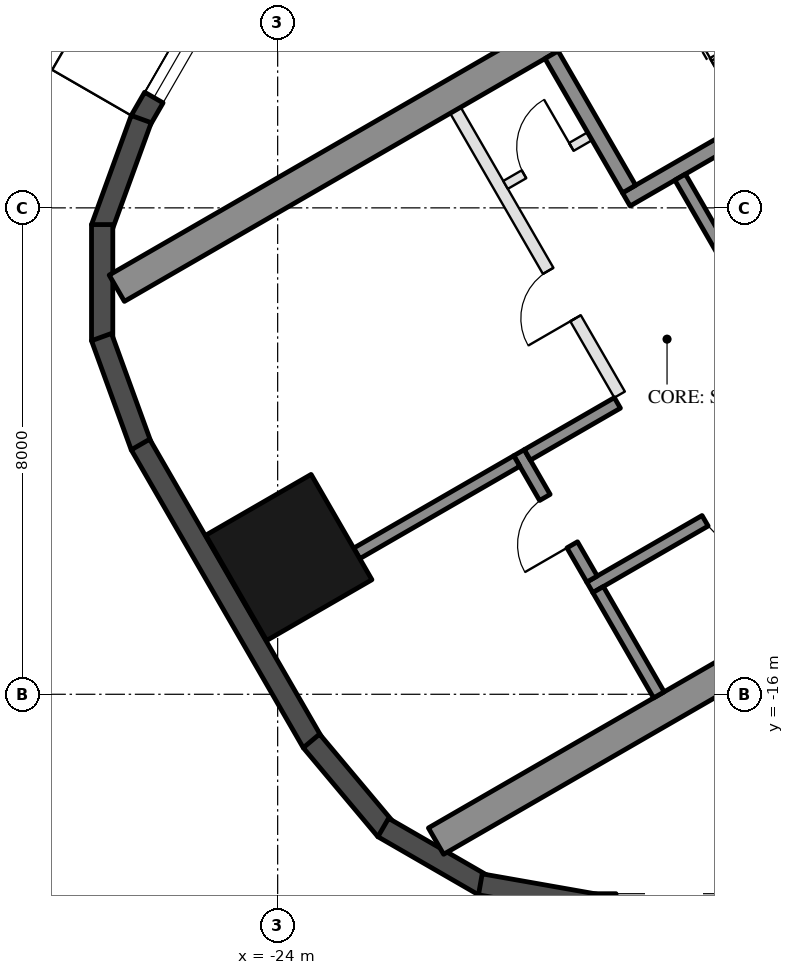
"""IFC4 building model, lengths in metres.
Left out: names, types, materials, properties, quantities, classifications, styles, units other than length and angle.
Written with IfcOpenShell. Run it as: python <this file> out.ifc"""

import sys

from ifc_helpers import new_model, si_unit, direction, frame, frame_2d, origin, origin_2d, place, context, subcontext, project, spatial, rectangle, hollow_rectangle, extrude, boolean, halfspace, element, fill, save


model = new_model("IFC4")
c1 = context("Model", 3, precision=1e-05, world=origin(), true_north=direction((0.0, 1.0)))
c2 = subcontext(c1, "Body", "Model", "MODEL_VIEW")
j1 = project(units=[si_unit("LENGTHUNIT", "METRE"), si_unit("PLANEANGLEUNIT", "RADIAN")], contexts=[c1])
p1 = place(None, origin())
s1 = spatial("IfcSite", under=j1, at=p1, CompositionType="ELEMENT")
p2 = place(p1, origin())
s2 = spatial("IfcBuilding", under=s1, at=p2, CompositionType="ELEMENT")
p3 = place(p2, frame((0.0, 0.0, 250.4)))
s3 = spatial("IfcBuildingStorey", under=s2, at=p3, CompositionType="ELEMENT", Elevation=250.4)
p4 = place(p3, frame((-23.816, -13.75, 0.0), z_axis=(0.0, 0.0, 1.0), x_axis=(-0.5, 0.866025403784, 0.0)))
e1 = element("IfcColumn", 1, at=p4, inside=s3, PredefinedType="COLUMN", context=c2, shape_type="SweptSolid", body=[
    boolean("DIFFERENCE", extrude(hollow_rectangle(XDim=2.0, YDim=2.0, WallThickness=0.05, at=origin_2d()), origin(), (0.0, 0.0, 1.0), 3.7), halfspace(frame((0.0, 0.0, 3.588), z_axis=(0.0, 0.0, 1.0), x_axis=(1.0, 0.0, 0.0)), False)),
])
p5 = place(p3, frame((-24.299, -3.176, 0.0), z_axis=(0.0, 0.0, 1.0), x_axis=(-0.500028278809, -0.866009076391, 0.0)))
e2 = element("IfcWall", 2, at=p5, inside=s3, PredefinedType="SOLIDWALL", context=c2, shape_type="SweptSolid", body=[
    extrude(rectangle(XDim=3.916, YDim=0.35, at=frame_2d((1.958, 0.0))), origin(), (0.0, 0.0, 1.0), 3.55),
])
p6 = place(p5, frame((1.575, 0.0, 0.3)))
e3 = element("IfcOpeningElement", 3, at=p6, cuts=e2, PredefinedType="OPENING", context=c2, shape_type="SweptSolid", body=[
    extrude(rectangle(XDim=1.9, YDim=2.65, at=frame_2d((0.95, 1.325))), frame((0.0, 0.185, 0.0), z_axis=(0.0, -1.0, 0.0), x_axis=(1.0, 0.0, 0.0)), (0.0, 0.0, 1.0), 0.37),
])
for number, where, z_axis, x_axis in (
    (4, (-26.244, -6.54, 0.0), (0.0, 0.0, 1.0), (-0.342, -0.94, 0.0)),
    (5, (-26.886, -8.275, 0.0), (0.0, 0.0, 1.0), (0.0, -1.0, 0.0)),
    (6, (-26.897, -10.125, 0.0), (0.0, 0.0, 1.0), (0.342, -0.94, 0.0)),
):
    element("IfcWall", number, at=place(p3, frame(where, z_axis=z_axis, x_axis=x_axis)), inside=s3, PredefinedType="SOLIDWALL", context=c2, shape_type="SweptSolid", body=[
        extrude(rectangle(XDim=1.91, YDim=0.35, at=frame_2d((0.955, 0.0))), origin(), (0.0, 0.0, 1.0), 3.55),
    ])
p7 = place(p3, frame((-26.257, -11.893, 0.0), z_axis=(0.0, 0.0, 1.0), x_axis=(0.500018773155, -0.866014564827, 0.0)))
e7 = element("IfcWall", 7, at=p7, inside=s3, PredefinedType="SOLIDWALL", context=c2, shape_type="SweptSolid", body=[
    extrude(rectangle(XDim=5.658, YDim=0.35, at=frame_2d((2.829, 0.0))), origin(), (0.0, 0.0, 1.0), 3.55),
])
for number, where, z_axis, x_axis in (
    (8, (-23.445, -16.768, 0.0), (0.0, 0.0, 1.0), (0.643, -0.766, 0.0)),
    (9, (-22.264, -18.192, 0.0), (0.0, 0.0, 1.0), (0.866, -0.5, 0.0)),
):
    element("IfcWall", number, at=place(p3, frame(where, z_axis=z_axis, x_axis=x_axis)), inside=s3, PredefinedType="SOLIDWALL", context=c2, shape_type="SweptSolid", body=[
        extrude(rectangle(XDim=1.91, YDim=0.35, at=frame_2d((0.955, 0.0))), origin(), (0.0, 0.0, 1.0), 3.55),
    ])
p8 = place(p3, frame((-20.667, -19.126, 0.0), z_axis=(0.0, 0.0, 1.0), x_axis=(0.984798995425, -0.173697837091, 0.0)))
e10 = element("IfcWall", 10, at=p8, inside=s3, PredefinedType="SOLIDWALL", context=c2, shape_type="SweptSolid", body=[
    extrude(rectangle(XDim=1.91, YDim=0.35, at=frame_2d((0.955, 0.0))), origin(), (0.0, 0.0, 1.0), 3.55),
])
p9 = place(p3, frame((-18.816, -19.455, 0.0), z_axis=(0.0, 0.0, 1.0), x_axis=(1.0, 0.0, 0.0)))
e11 = element("IfcWall", 11, at=p9, inside=s3, PredefinedType="SOLIDWALL", context=c2, shape_type="SweptSolid", body=[
    extrude(rectangle(XDim=11.816, YDim=0.35, at=frame_2d((5.908, 0.0))), origin(), (0.0, 0.0, 1.0), 3.55),
])
p10 = place(p9, frame((0.381, 0.0, 0.3)))
e12 = element("IfcOpeningElement", 12, at=p10, cuts=e11, PredefinedType="OPENING", context=c2, shape_type="SweptSolid", body=[
    extrude(rectangle(XDim=1.9, YDim=2.65, at=frame_2d((0.95, 1.325))), frame((0.0, 0.185, 0.0), z_axis=(0.0, -1.0, 0.0), x_axis=(1.0, 0.0, 0.0)), (0.0, 0.0, 1.0), 0.37),
])
p11 = place(p9, frame((7.841, 0.0, 0.0)))
e13 = element("IfcOpeningElement", 13, at=p11, cuts=e11, PredefinedType="OPENING", context=c2, shape_type="SweptSolid", body=[
    extrude(rectangle(XDim=2.4, YDim=2.4, at=frame_2d((1.2, 1.2))), frame((0.0, 0.185, 0.0), z_axis=(0.0, -1.0, 0.0), x_axis=(1.0, 0.0, 0.0)), (0.0, 0.0, 1.0), 0.37),
])
p12 = place(p9, frame((3.691, 0.0, 0.3)))
e14 = element("IfcOpeningElement", 14, at=p12, cuts=e11, PredefinedType="OPENING", context=c2, shape_type="SweptSolid", body=[
    extrude(rectangle(XDim=1.7, YDim=2.65, at=frame_2d((0.85, 1.325))), frame((0.0, 0.185, 0.0), z_axis=(0.0, -1.0, 0.0), x_axis=(1.0, 0.0, 0.0)), (0.0, 0.0, 1.0), 0.37),
])
p13 = place(p9, frame((5.691, 0.0, 0.3)))
e15 = element("IfcOpeningElement", 15, at=p13, cuts=e11, PredefinedType="OPENING", context=c2, shape_type="SweptSolid", body=[
    extrude(rectangle(XDim=1.7, YDim=2.65, at=frame_2d((0.85, 1.325))), frame((0.0, 0.185, 0.0), z_axis=(0.0, -1.0, 0.0), x_axis=(1.0, 0.0, 0.0)), (0.0, 0.0, 1.0), 0.37),
])
for number, where, z_axis, x_axis in (
    (16, (-13.797, -1.903, 0.0), (0.0, 0.0, 1.0), (-0.866, -0.5, 0.0)),
    (17, (-8.547, -10.997, 0.0), (0.0, 0.0, 1.0), (-0.866, -0.5, 0.0)),
):
    element("IfcWall", number, at=place(p3, frame(where, z_axis=z_axis, x_axis=x_axis)), inside=s3, PredefinedType="SHEAR", context=c2, shape_type="SweptSolid", body=[
        extrude(rectangle(XDim=14.837, YDim=0.5, at=frame_2d((7.418, 0.0))), origin(), (0.0, 0.0, 1.0), 3.5),
    ])
p14 = place(p3, frame((-12.681, -4.636, 0.0), z_axis=(0.0, 0.0, 1.0), x_axis=(-0.866021702275, -0.500006411147, 0.0)))
e18 = element("IfcWall", 18, at=p14, inside=s3, PredefinedType="SHEAR", context=c2, shape_type="SweptSolid", body=[
    extrude(rectangle(XDim=6.45, YDim=0.25, at=frame_2d((3.225, 0.0))), origin(), (0.0, 0.0, 1.0), 3.5),
])
p15 = place(p14, frame((0.3, 0.0, 0.0)))
e19 = element("IfcOpeningElement", 19, at=p15, cuts=e18, PredefinedType="OPENING", context=c2, shape_type="SweptSolid", body=[
    extrude(rectangle(XDim=1.0, YDim=2.1, at=frame_2d((0.5, 1.05))), frame((0.0, 0.135, 0.0), z_axis=(0.0, -1.0, 0.0), x_axis=(1.0, 0.0, 0.0)), (0.0, 0.0, 1.0), 0.27),
])
p16 = place(p3, frame((-19.496, -5.482, 0.0), z_axis=(0.0, 0.0, 1.0), x_axis=(0.499990435942, -0.866030925526, 0.0)))
e20 = element("IfcWall", 20, at=p16, inside=s3, PredefinedType="SHEAR", context=c2, shape_type="SweptSolid", body=[
    extrude(rectangle(XDim=2.55, YDim=0.25, at=frame_2d((1.275, 0.0))), origin(), (0.0, 0.0, 1.0), 3.5),
])
p17 = place(p3, frame((-17.381, -7.495, 0.0), z_axis=(0.0, 0.0, 1.0), x_axis=(0.500011755427, -0.866018616679, 0.0)))
e21 = element("IfcWall", 21, at=p17, inside=s3, PredefinedType="SHEAR", context=c2, shape_type="SweptSolid", body=[
    extrude(rectangle(XDim=2.8, YDim=0.2, at=frame_2d((1.4, 0.0))), origin(), (0.0, 0.0, 1.0), 3.5),
])
p18 = place(p3, frame((-10.068, -9.162, 0.0), z_axis=(0.0, 0.0, 1.0), x_axis=(-0.866032725843, -0.499987317609, 0.0)))
e22 = element("IfcWall", 22, at=p18, inside=s3, PredefinedType="SHEAR", context=c2, shape_type="SweptSolid", body=[
    extrude(rectangle(XDim=10.16, YDim=0.2, at=frame_2d((5.08, 0.0))), origin(), (0.0, 0.0, 1.0), 3.5),
])
p19 = place(p18, frame((1.99, 0.0, 0.0)))
e23 = element("IfcOpeningElement", 23, at=p19, cuts=e22, PredefinedType="OPENING", context=c2, shape_type="SweptSolid", body=[
    extrude(rectangle(XDim=0.9, YDim=2.1, at=frame_2d((0.45, 1.05))), frame((0.0, 0.11, 0.0), z_axis=(0.0, -1.0, 0.0), x_axis=(1.0, 0.0, 0.0)), (0.0, 0.0, 1.0), 0.22),
])
p20 = place(p18, frame((7.07, 0.0, 0.0)))
e24 = element("IfcOpeningElement", 24, at=p20, cuts=e22, PredefinedType="OPENING", context=c2, shape_type="SweptSolid", body=[
    extrude(rectangle(XDim=0.9, YDim=2.1, at=frame_2d((0.45, 1.05))), frame((0.0, 0.11, 0.0), z_axis=(0.0, -1.0, 0.0), x_axis=(1.0, 0.0, 0.0)), (0.0, 0.0, 1.0), 0.22),
])
p21 = place(p3, frame((-20.031, -12.026, 0.0), z_axis=(0.0, 0.0, 1.0), x_axis=(0.500033551112, -0.866006032174, 0.0)))
e25 = element("IfcWall", 25, at=p21, inside=s3, PredefinedType="SHEAR", context=c2, shape_type="SweptSolid", body=[
    extrude(rectangle(XDim=2.4, YDim=0.2, at=frame_2d((1.2, 0.0))), origin(), (0.0, 0.0, 1.0), 3.5),
])
p22 = place(p21, frame((0.85, 0.0, 0.0)))
e26 = element("IfcOpeningElement", 26, at=p22, cuts=e25, PredefinedType="OPENING", context=c2, shape_type="SweptSolid", body=[
    extrude(rectangle(XDim=0.9, YDim=2.1, at=frame_2d((0.45, 1.05))), frame((0.0, 0.11, 0.0), z_axis=(0.0, -1.0, 0.0), x_axis=(1.0, 0.0, 0.0)), (0.0, 0.0, 1.0), 0.22),
])
p23 = place(p3, frame((-18.413, -11.208, 0.0), z_axis=(0.0, 0.0, 1.0), x_axis=(-0.866038183914, -0.499977863513, 0.0)))
e27 = element("IfcWall", 27, at=p23, inside=s3, PredefinedType="SHEAR", context=c2, shape_type="SweptSolid", body=[
    extrude(rectangle(XDim=1.71, YDim=0.2, at=frame_2d((0.855, 0.0))), origin(), (0.0, 0.0, 1.0), 3.5),
])
p24 = place(p3, frame((-18.73, -14.278, 0.0), z_axis=(0.0, 0.0, 1.0), x_axis=(0.50002537861, -0.866010750942, 0.0)))
e28 = element("IfcWall", 28, at=p24, inside=s3, PredefinedType="SHEAR", context=c2, shape_type="SweptSolid", body=[
    extrude(rectangle(XDim=2.0, YDim=0.2, at=frame_2d((1.0, 0.0))), origin(), (0.0, 0.0, 1.0), 3.5),
])
p25 = place(p3, frame((-20.067, -12.163, 0.0), z_axis=(0.0, 0.0, 1.0), x_axis=(-0.866030456496, -0.499991248344, 0.0)))
e29 = element("IfcWall", 29, at=p25, inside=s3, PredefinedType="SHEAR", context=c2, shape_type="SweptSolid", body=[
    extrude(rectangle(XDim=3.04, YDim=0.2, at=frame_2d((1.52, 0.0))), origin(), (0.0, 0.0, 1.0), 3.5),
])
p26 = place(p3, frame((-21.076, -6.395, 0.0), z_axis=(0.0, 0.0, 1.0), x_axis=(0.50001468107, -0.866016927499, 0.0)))
e30 = element("IfcWall", 30, at=p26, inside=s3, PredefinedType="PARTITIONING", context=c2, shape_type="SweptSolid", body=[
    extrude(rectangle(XDim=5.4, YDim=0.2, at=frame_2d((2.7, 0.0))), origin(), (0.0, 0.0, 1.0), 3.5),
])
p27 = place(p26, frame((3.05, 0.0, 0.0)))
e31 = element("IfcOpeningElement", 31, at=p27, cuts=e30, PredefinedType="OPENING", context=c2, shape_type="SweptSolid", body=[
    extrude(rectangle(XDim=0.9, YDim=2.1, at=frame_2d((0.45, 1.05))), frame((0.0, 0.11, 0.0), z_axis=(0.0, -1.0, 0.0), x_axis=(1.0, 0.0, 0.0)), (0.0, 0.0, 1.0), 0.22),
])
p28 = place(p3, frame((-18.866, -6.822, 0.0), z_axis=(0.0, 0.0, 1.0), x_axis=(-0.866028054938, -0.499995408039, 0.0)))
e32 = element("IfcWall", 32, at=p28, inside=s3, PredefinedType="PARTITIONING", context=c2, shape_type="SweptSolid", body=[
    extrude(rectangle(XDim=1.6, YDim=0.15, at=frame_2d((0.8, 0.0))), origin(), (0.0, 0.0, 1.0), 3.5),
])
p29 = place(p28, frame((0.35, 0.0, 0.0)))
e33 = element("IfcOpeningElement", 33, at=p29, cuts=e32, PredefinedType="OPENING", context=c2, shape_type="SweptSolid", body=[
    extrude(rectangle(XDim=0.9, YDim=2.1, at=frame_2d((0.45, 1.05))), frame((0.0, 0.085, 0.0), z_axis=(0.0, -1.0, 0.0), x_axis=(1.0, 0.0, 0.0)), (0.0, 0.0, 1.0), 0.17),
])
p30 = place(p6, origin())
e34 = element("IfcWindow", 34, at=p30, inside=s3, PartitioningType="SINGLE_PANEL", PredefinedType="WINDOW", context=c2, shape_type="SweptSolid", body=[
    extrude(rectangle(XDim=1.9, YDim=2.65, at=frame_2d((0.95, 1.325))), frame((0.0, 0.03, 0.0), z_axis=(0.0, -1.0, 0.0), x_axis=(1.0, 0.0, 0.0)), (0.0, 0.0, 1.0), 0.06),
])
fill(e3, e34)
p31 = place(p29, frame((0.9, 0.0, 0.0), z_axis=(0.0, 0.0, 1.0), x_axis=(-1.0, 0.0, 0.0)))
e35 = element("IfcDoor", 35, at=p31, inside=s3, OperationType="SINGLE_SWING_RIGHT", PredefinedType="DOOR", context=c2, shape_type="SweptSolid", body=[
    extrude(rectangle(XDim=0.9, YDim=2.1, at=frame_2d((0.45, 1.05))), frame((0.0, 0.025, 0.0), z_axis=(0.0, -1.0, 0.0), x_axis=(1.0, 0.0, 0.0)), (0.0, 0.0, 1.0), 0.05),
])
fill(e33, e35)
p32 = place(p20, origin())
e36 = element("IfcDoor", 36, at=p32, inside=s3, OperationType="SINGLE_SWING_LEFT", PredefinedType="DOOR", context=c2, shape_type="SweptSolid", body=[
    extrude(rectangle(XDim=0.9, YDim=2.1, at=frame_2d((0.45, 1.05))), frame((0.0, 0.025, 0.0), z_axis=(0.0, -1.0, 0.0), x_axis=(1.0, 0.0, 0.0)), (0.0, 0.0, 1.0), 0.05),
])
fill(e24, e36)
p33 = place(p22, frame((0.9, 0.0, 0.0), z_axis=(0.0, 0.0, 1.0), x_axis=(-1.0, 0.0, 0.0)))
e37 = element("IfcDoor", 37, at=p33, inside=s3, OperationType="SINGLE_SWING_LEFT", PredefinedType="DOOR", context=c2, shape_type="SweptSolid", body=[
    extrude(rectangle(XDim=0.9, YDim=2.1, at=frame_2d((0.45, 1.05))), frame((0.0, 0.025, 0.0), z_axis=(0.0, -1.0, 0.0), x_axis=(1.0, 0.0, 0.0)), (0.0, 0.0, 1.0), 0.05),
])
fill(e26, e37)
p34 = place(p27, frame((0.9, 0.0, 0.0), z_axis=(0.0, 0.0, 1.0), x_axis=(-1.0, 0.0, 0.0)))
e38 = element("IfcDoor", 38, at=p34, inside=s3, OperationType="SINGLE_SWING_LEFT", PredefinedType="DOOR", context=c2, shape_type="SweptSolid", body=[
    extrude(rectangle(XDim=0.9, YDim=2.1, at=frame_2d((0.45, 1.05))), frame((0.0, 0.025, 0.0), z_axis=(0.0, -1.0, 0.0), x_axis=(1.0, 0.0, 0.0)), (0.0, 0.0, 1.0), 0.05),
])
fill(e31, e38)
save(model, sys.argv[1])
